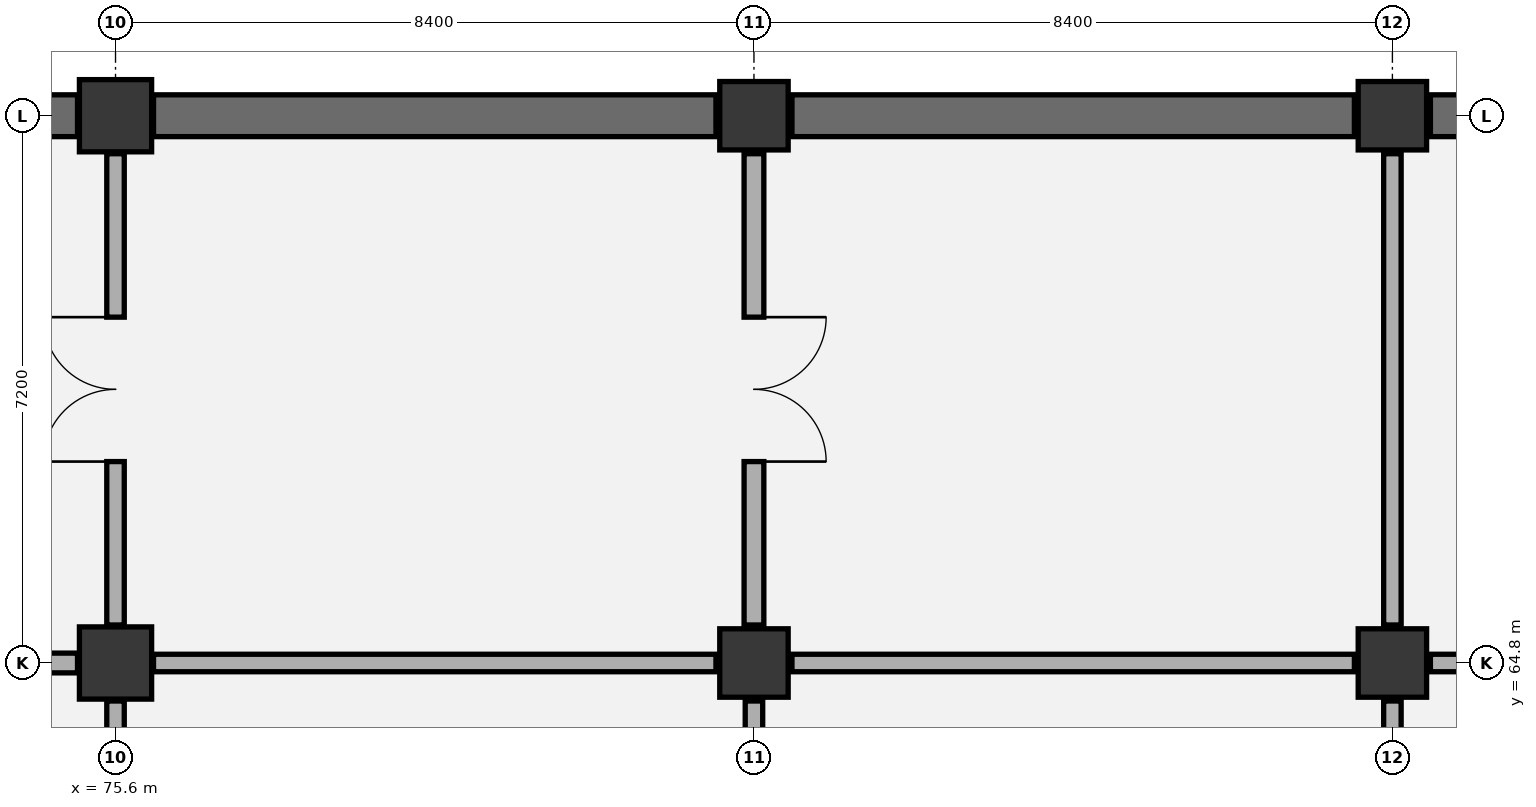
"""IFC4 building model, lengths in metres.
Left out: names, types, materials, properties, quantities, classifications, styles, units other than length and angle.
Written with IfcOpenShell. Run it as: python <this file> out.ifc"""

import sys

from ifc_helpers import new_model, si_unit, direction, frame, frame_2d, origin, origin_2d, place, context, subcontext, project, spatial, rectangle, extrude, element, fill, save


model = new_model("IFC4")
c1 = context("Model", 3, precision=1e-05, world=origin(), true_north=direction((0.0, 1.0)))
c2 = subcontext(c1, "Body", "Model", "MODEL_VIEW")
j1 = project(units=[si_unit("LENGTHUNIT", "METRE"), si_unit("PLANEANGLEUNIT", "RADIAN")], contexts=[c1])
p1 = place(None, origin())
s1 = spatial("IfcSite", under=j1, at=p1, CompositionType="ELEMENT")
p2 = place(p1, origin())
s2 = spatial("IfcBuilding", under=s1, at=p2, CompositionType="ELEMENT")
p3 = place(p2, frame((0.0, 0.0, -9.6)))
s3 = spatial("IfcBuildingStorey", under=s2, at=p3, CompositionType="ELEMENT", Elevation=-9.6)
for number, where, z_axis, x_axis in (
    (1, (75.6, 64.8, 0.0), (0.0, 0.0, 1.0), (1.0, 0.0, 0.0)),
    (2, (75.6, 72.0, 0.0), (0.0, 0.0, 1.0), (1.0, 0.0, 0.0)),
):
    element("IfcColumn", number, at=place(p3, frame(where, z_axis=z_axis, x_axis=x_axis)), inside=s3, PredefinedType="COLUMN", context=c2, shape_type="SweptSolid", body=[
        extrude(rectangle(XDim=0.95, YDim=0.95, at=origin_2d()), origin(), (0.0, 0.0, 1.0), 4.8),
    ])
for number, where, z_axis, x_axis in (
    (3, (84.0, 64.8, 0.0), (0.0, 0.0, 1.0), (1.0, 0.0, 0.0)),
    (4, (84.0, 72.0, 0.0), (0.0, 0.0, 1.0), (1.0, 0.0, 0.0)),
    (5, (92.4, 64.8, 0.0), (0.0, 0.0, 1.0), (1.0, 0.0, 0.0)),
    (6, (92.4, 72.0, 0.0), (0.0, 0.0, 1.0), (1.0, 0.0, 0.0)),
):
    element("IfcColumn", number, at=place(p3, frame(where, z_axis=z_axis, x_axis=x_axis)), inside=s3, PredefinedType="COLUMN", context=c2, shape_type="SweptSolid", body=[
        extrude(rectangle(XDim=0.9, YDim=0.9, at=origin_2d()), origin(), (0.0, 0.0, 1.0), 4.8),
    ])
p4 = place(p3, frame((67.7, 72.0, 0.0), z_axis=(0.0, 0.0, 1.0), x_axis=(1.0, 0.0, 0.0)))
e7 = element("IfcWall", 7, at=p4, inside=s3, PredefinedType="USERDEFINED", context=c2, shape_type="SweptSolid", body=[
    extrude(rectangle(XDim=7.4, YDim=0.55, at=frame_2d((3.7, 0.0))), origin(), (0.0, 0.0, 1.0), 4.4),
])
for number, where, z_axis, x_axis in (
    (8, (76.1, 72.0, 0.0), (0.0, 0.0, 1.0), (1.0, 0.0, 0.0)),
    (9, (84.5, 72.0, 0.0), (0.0, 0.0, 1.0), (1.0, 0.0, 0.0)),
):
    element("IfcWall", number, at=place(p3, frame(where, z_axis=z_axis, x_axis=x_axis)), inside=s3, PredefinedType="USERDEFINED", context=c2, shape_type="SweptSolid", body=[
        extrude(rectangle(XDim=7.4, YDim=0.55, at=frame_2d((3.7, 0.0))), origin(), (0.0, 0.0, 1.0), 4.4),
    ])
p5 = place(p3, frame((92.9, 72.0, 0.0), z_axis=(0.0, 0.0, 1.0), x_axis=(1.0, 0.0, 0.0)))
e10 = element("IfcWall", 10, at=p5, inside=s3, PredefinedType="USERDEFINED", context=c2, shape_type="SweptSolid", body=[
    extrude(rectangle(XDim=7.4, YDim=0.55, at=frame_2d((3.7, 0.0))), origin(), (0.0, 0.0, 1.0), 4.4),
])
p6 = place(p3, frame((75.6, 58.1, 0.0), z_axis=(0.0, 0.0, 1.0), x_axis=(0.0, 1.0, 0.0)))
e11 = element("IfcWall", 11, at=p6, inside=s3, PredefinedType="PARTITIONING", context=c2, shape_type="SweptSolid", body=[
    extrude(rectangle(XDim=6.2, YDim=0.23, at=frame_2d((3.1, 0.0))), origin(), (0.0, 0.0, 1.0), 3.595),
])
p7 = place(p3, frame((67.7, 64.8, 0.0), z_axis=(0.0, 0.0, 1.0), x_axis=(1.0, 0.0, 0.0)))
e12 = element("IfcWall", 12, at=p7, inside=s3, PredefinedType="PARTITIONING", context=c2, shape_type="SweptSolid", body=[
    extrude(rectangle(XDim=7.4, YDim=0.26, at=frame_2d((3.7, 0.0))), origin(), (0.0, 0.0, 1.0), 3.495),
])
p8 = place(p7, frame((2.7, 0.0, 0.0)))
e13 = element("IfcOpeningElement", 13, at=p8, cuts=e12, PredefinedType="OPENING", context=c2, shape_type="SweptSolid", body=[
    extrude(rectangle(XDim=2.0, YDim=2.35, at=frame_2d((1.0, 1.175))), frame((0.0, 0.14, 0.0), z_axis=(0.0, -1.0, 0.0), x_axis=(1.0, 0.0, 0.0)), (0.0, 0.0, 1.0), 0.28),
])
p9 = place(p3, frame((75.6, 65.3, 0.0), z_axis=(0.0, 0.0, 1.0), x_axis=(0.0, 1.0, 0.0)))
e14 = element("IfcWall", 14, at=p9, inside=s3, PredefinedType="PARTITIONING", context=c2, shape_type="SweptSolid", body=[
    extrude(rectangle(XDim=6.2, YDim=0.23, at=frame_2d((3.1, 0.0))), origin(), (0.0, 0.0, 1.0), 3.595),
])
p10 = place(p9, frame((2.15, 0.0, 0.0)))
e15 = element("IfcOpeningElement", 15, at=p10, cuts=e14, PredefinedType="OPENING", context=c2, shape_type="SweptSolid", body=[
    extrude(rectangle(XDim=1.9, YDim=2.3, at=frame_2d((0.95, 1.15))), frame((0.0, 0.125, 0.0), z_axis=(0.0, -1.0, 0.0), x_axis=(1.0, 0.0, 0.0)), (0.0, 0.0, 1.0), 0.25),
])
p11 = place(p3, frame((84.0, 58.1, 0.0), z_axis=(0.0, 0.0, 1.0), x_axis=(0.0, 1.0, 0.0)))
e16 = element("IfcWall", 16, at=p11, inside=s3, PredefinedType="PARTITIONING", context=c2, shape_type="SweptSolid", body=[
    extrude(rectangle(XDim=6.2, YDim=0.23, at=frame_2d((3.1, 0.0))), origin(), (0.0, 0.0, 1.0), 3.595),
])
p12 = place(p11, frame((0.25, 0.0, 0.0)))
e17 = element("IfcOpeningElement", 17, at=p12, cuts=e16, PredefinedType="OPENING", context=c2, shape_type="SweptSolid", body=[
    extrude(rectangle(XDim=1.05, YDim=2.15, at=frame_2d((0.525, 1.075))), frame((0.0, 0.125, 0.0), z_axis=(0.0, -1.0, 0.0), x_axis=(1.0, 0.0, 0.0)), (0.0, 0.0, 1.0), 0.25),
])
p13 = place(p3, frame((76.1, 64.8, 0.0), z_axis=(0.0, 0.0, 1.0), x_axis=(1.0, 0.0, 0.0)))
e18 = element("IfcWall", 18, at=p13, inside=s3, PredefinedType="PARTITIONING", context=c2, shape_type="SweptSolid", body=[
    extrude(rectangle(XDim=7.4, YDim=0.23, at=frame_2d((3.7, 0.0))), origin(), (0.0, 0.0, 1.0), 3.495),
])
p14 = place(p3, frame((84.0, 65.3, 0.0), z_axis=(0.0, 0.0, 1.0), x_axis=(0.0, 1.0, 0.0)))
e19 = element("IfcWall", 19, at=p14, inside=s3, PredefinedType="PARTITIONING", context=c2, shape_type="SweptSolid", body=[
    extrude(rectangle(XDim=6.2, YDim=0.26, at=frame_2d((3.1, 0.0))), origin(), (0.0, 0.0, 1.0), 3.595),
])
p15 = place(p14, frame((2.15, 0.0, 0.0)))
e20 = element("IfcOpeningElement", 20, at=p15, cuts=e19, PredefinedType="OPENING", context=c2, shape_type="SweptSolid", body=[
    extrude(rectangle(XDim=1.9, YDim=2.3, at=frame_2d((0.95, 1.15))), frame((0.0, 0.14, 0.0), z_axis=(0.0, -1.0, 0.0), x_axis=(1.0, 0.0, 0.0)), (0.0, 0.0, 1.0), 0.28),
])
p16 = place(p3, frame((92.4, 58.1, 0.0), z_axis=(0.0, 0.0, 1.0), x_axis=(0.0, 1.0, 0.0)))
e21 = element("IfcWall", 21, at=p16, inside=s3, PredefinedType="PARTITIONING", context=c2, shape_type="SweptSolid", body=[
    extrude(rectangle(XDim=6.2, YDim=0.23, at=frame_2d((3.1, 0.0))), origin(), (0.0, 0.0, 1.0), 3.595),
])
p17 = place(p16, frame((0.25, 0.0, 0.0)))
e22 = element("IfcOpeningElement", 22, at=p17, cuts=e21, PredefinedType="OPENING", context=c2, shape_type="SweptSolid", body=[
    extrude(rectangle(XDim=1.05, YDim=2.15, at=frame_2d((0.525, 1.075))), frame((0.0, 0.125, 0.0), z_axis=(0.0, -1.0, 0.0), x_axis=(1.0, 0.0, 0.0)), (0.0, 0.0, 1.0), 0.25),
])
p18 = place(p3, frame((84.5, 64.8, 0.0), z_axis=(0.0, 0.0, 1.0), x_axis=(1.0, 0.0, 0.0)))
e23 = element("IfcWall", 23, at=p18, inside=s3, PredefinedType="PARTITIONING", context=c2, shape_type="SweptSolid", body=[
    extrude(rectangle(XDim=7.4, YDim=0.23, at=frame_2d((3.7, 0.0))), origin(), (0.0, 0.0, 1.0), 3.495),
])
p19 = place(p3, frame((92.4, 65.3, 0.0), z_axis=(0.0, 0.0, 1.0), x_axis=(0.0, 1.0, 0.0)))
e24 = element("IfcWall", 24, at=p19, inside=s3, PredefinedType="PARTITIONING", context=c2, shape_type="SweptSolid", body=[
    extrude(rectangle(XDim=6.2, YDim=0.23, at=frame_2d((3.1, 0.0))), origin(), (0.0, 0.0, 1.0), 3.595),
])
p20 = place(p3, frame((92.9, 64.8, 0.0), z_axis=(0.0, 0.0, 1.0), x_axis=(1.0, 0.0, 0.0)))
e25 = element("IfcWall", 25, at=p20, inside=s3, PredefinedType="PARTITIONING", context=c2, shape_type="SweptSolid", body=[
    extrude(rectangle(XDim=7.4, YDim=0.23, at=frame_2d((3.7, 0.0))), origin(), (0.0, 0.0, 1.0), 3.495),
])
p21 = place(p10, origin())
e26 = element("IfcDoor", 26, at=p21, inside=s3, OperationType="DOUBLE_DOOR_SINGLE_SWING", PredefinedType="DOOR", context=c2, shape_type="SweptSolid", body=[
    extrude(rectangle(XDim=1.9, YDim=2.3, at=frame_2d((0.95, 1.15))), frame((0.0, 0.025, 0.0), z_axis=(0.0, -1.0, 0.0), x_axis=(1.0, 0.0, 0.0)), (0.0, 0.0, 1.0), 0.05),
])
fill(e15, e26)
p22 = place(p15, frame((1.9, 0.0, 0.0), z_axis=(0.0, 0.0, 1.0), x_axis=(-1.0, 0.0, 0.0)))
e27 = element("IfcDoor", 27, at=p22, inside=s3, OperationType="DOUBLE_DOOR_SINGLE_SWING", PredefinedType="DOOR", context=c2, shape_type="SweptSolid", body=[
    extrude(rectangle(XDim=1.9, YDim=2.3, at=frame_2d((0.95, 1.15))), frame((0.0, 0.025, 0.0), z_axis=(0.0, -1.0, 0.0), x_axis=(1.0, 0.0, 0.0)), (0.0, 0.0, 1.0), 0.05),
])
fill(e20, e27)
save(model, sys.argv[1])
